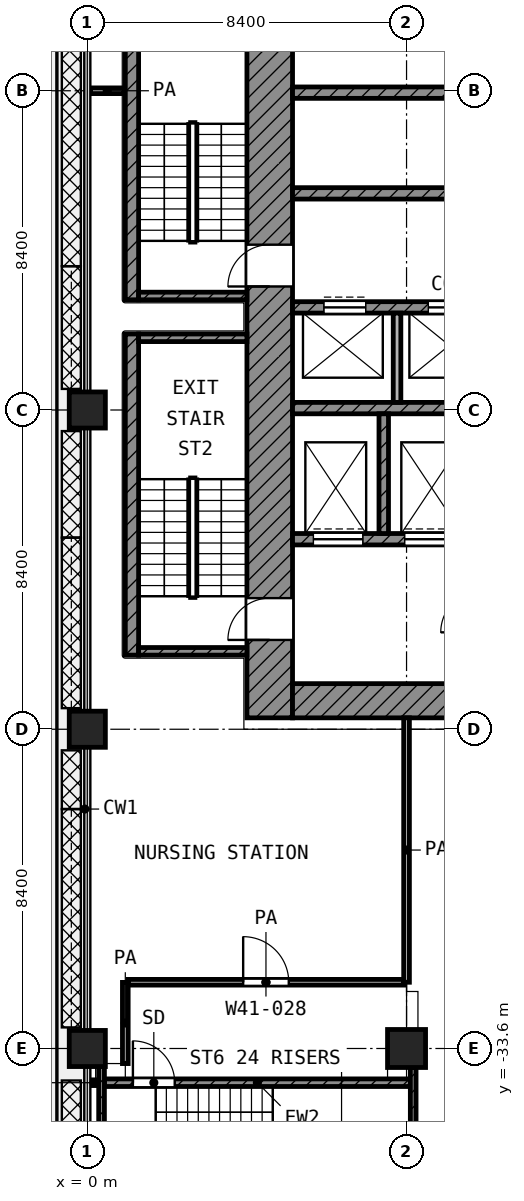
"""IFC4 building model, lengths in metres.
Left out: names, types, materials, properties, quantities, classifications, styles, units other than length and angle.
Written with IfcOpenShell. Run it as: python <this file> out.ifc"""

import sys

from ifc_helpers import new_model, si_unit, direction, frame, frame_2d, origin, origin_2d, place, context, subcontext, project, spatial, rectangle, extrude, element, fill, save


model = new_model("IFC4")
c1 = context("Model", 3, precision=1e-05, world=origin(), true_north=direction((0.0, 1.0)))
c2 = subcontext(c1, "Body", "Model", "MODEL_VIEW")
j1 = project(units=[si_unit("LENGTHUNIT", "METRE"), si_unit("PLANEANGLEUNIT", "RADIAN")], contexts=[c1])
p1 = place(None, origin())
s1 = spatial("IfcSite", under=j1, at=p1, CompositionType="ELEMENT")
p2 = place(p1, origin())
s2 = spatial("IfcBuilding", under=s1, at=p2, CompositionType="ELEMENT")
p3 = place(p2, frame((0.0, 0.0, 179.4)))
s3 = spatial("IfcBuildingStorey", under=s2, at=p3, CompositionType="ELEMENT", Elevation=179.4)
for number, where, z_axis, x_axis in (
    (1, (0.0, -16.8, 0.0), (0.0, 0.0, 1.0), (1.0, 0.0, 0.0)),
    (2, (0.0, -25.2, 0.0), (0.0, 0.0, 1.0), (1.0, 0.0, 0.0)),
    (3, (0.0, -33.6, 0.0), (0.0, 0.0, 1.0), (1.0, 0.0, 0.0)),
):
    element("IfcColumn", number, at=place(p3, frame(where, z_axis=z_axis, x_axis=x_axis)), inside=s3, PredefinedType="COLUMN", context=c2, shape_type="SweptSolid", body=[
        extrude(rectangle(XDim=0.95, YDim=0.95, at=origin_2d()), origin(), (0.0, 0.0, 1.0), 4.2),
    ])
p4 = place(p3, frame((8.4, -33.6, 0.0), z_axis=(0.0, 0.0, 1.0), x_axis=(1.0, 0.0, 0.0)))
e4 = element("IfcColumn", 4, at=p4, inside=s3, PredefinedType="COLUMN", context=c2, shape_type="SweptSolid", body=[
    extrude(rectangle(XDim=1.0, YDim=1.0, at=origin_2d()), origin(), (0.0, 0.0, 1.0), 4.2),
])
p5 = place(p3, frame((4.8, -24.9, 0.0), z_axis=(0.0, 0.0, 1.0), x_axis=(0.0, 1.0, 0.0)))
e5 = element("IfcWall", 5, at=p5, inside=s3, PredefinedType="SHEAR", context=c2, shape_type="SweptSolid", body=[
    extrude(rectangle(XDim=19.5, YDim=1.2, at=frame_2d((9.75, 0.0))), origin(), (0.0, 0.0, 1.0), 3.6),
])
p6 = place(p5, frame((11.35, 0.0, 0.0)))
e6 = element("IfcOpeningElement", 6, at=p6, cuts=e5, PredefinedType="OPENING", context=c2, shape_type="SweptSolid", body=[
    extrude(rectangle(XDim=1.1, YDim=2.1, at=frame_2d((0.55, 1.05))), frame((0.0, 0.61, 0.0), z_axis=(0.0, -1.0, 0.0), x_axis=(1.0, 0.0, 0.0)), (0.0, 0.0, 1.0), 1.22),
])
p7 = place(p5, frame((2.05, 0.0, 0.0)))
e7 = element("IfcOpeningElement", 7, at=p7, cuts=e5, PredefinedType="OPENING", context=c2, shape_type="SweptSolid", body=[
    extrude(rectangle(XDim=1.1, YDim=2.1, at=frame_2d((0.55, 1.05))), frame((0.0, 0.61, 0.0), z_axis=(0.0, -1.0, 0.0), x_axis=(1.0, 0.0, 0.0)), (0.0, 0.0, 1.0), 1.22),
])
p8 = place(p3, frame((5.4, -24.45, 0.0), z_axis=(0.0, 0.0, 1.0), x_axis=(1.0, 0.0, 0.0)))
e8 = element("IfcWall", 8, at=p8, inside=s3, PredefinedType="SHEAR", context=c2, shape_type="SweptSolid", body=[
    extrude(rectangle(XDim=18.6, YDim=0.9, at=frame_2d((9.3, 0.0))), origin(), (0.0, 0.0, 1.0), 3.6),
])
p9 = place(p8, frame((6.3, 0.0, 0.0)))
e9 = element("IfcOpeningElement", 9, at=p9, cuts=e8, PredefinedType="OPENING", context=c2, shape_type="SweptSolid", body=[
    extrude(rectangle(XDim=1.8, YDim=2.1, at=frame_2d((0.9, 1.05))), frame((0.0, 0.46, 0.0), z_axis=(0.0, -1.0, 0.0), x_axis=(1.0, 0.0, 0.0)), (0.0, 0.0, 1.0), 0.92),
])
p10 = place(p3, frame((5.4, -8.45, 0.0), z_axis=(0.0, 0.0, 1.0), x_axis=(1.0, 0.0, 0.0)))
e10 = element("IfcWall", 10, at=p10, inside=s3, PredefinedType="SHEAR", context=c2, shape_type="SweptSolid", body=[
    extrude(rectangle(XDim=16.65, YDim=0.3, at=frame_2d((8.325, 0.0))), origin(), (0.0, 0.0, 1.0), 3.6),
])
p11 = place(p3, frame((5.4, -11.1, 0.0), z_axis=(0.0, 0.0, 1.0), x_axis=(1.0, 0.0, 0.0)))
e11 = element("IfcWall", 11, at=p11, inside=s3, PredefinedType="SHEAR", context=c2, shape_type="SweptSolid", body=[
    extrude(rectangle(XDim=16.65, YDim=0.3, at=frame_2d((8.325, 0.0))), origin(), (0.0, 0.0, 1.0), 3.6),
])
p12 = place(p11, frame((11.825, 0.0, 0.0)))
e12 = element("IfcOpeningElement", 12, at=p12, cuts=e11, PredefinedType="OPENING", context=c2, shape_type="SweptSolid", body=[
    extrude(rectangle(XDim=1.1, YDim=2.1, at=frame_2d((0.55, 1.05))), frame((0.0, 0.16, 0.0), z_axis=(0.0, -1.0, 0.0), x_axis=(1.0, 0.0, 0.0)), (0.0, 0.0, 1.0), 0.32),
])
p13 = place(p11, frame((14.575, 0.0, 0.0)))
e13 = element("IfcOpeningElement", 13, at=p13, cuts=e11, PredefinedType="OPENING", context=c2, shape_type="SweptSolid", body=[
    extrude(rectangle(XDim=1.1, YDim=2.1, at=frame_2d((0.55, 1.05))), frame((0.0, 0.16, 0.0), z_axis=(0.0, -1.0, 0.0), x_axis=(1.0, 0.0, 0.0)), (0.0, 0.0, 1.0), 0.32),
])
p14 = place(p11, frame((5.05, 0.0, 0.0)))
e14 = element("IfcOpeningElement", 14, at=p14, cuts=e11, PredefinedType="OPENING", context=c2, shape_type="SweptSolid", body=[
    extrude(rectangle(XDim=0.9, YDim=2.1, at=frame_2d((0.45, 1.05))), frame((0.0, 0.16, 0.0), z_axis=(0.0, -1.0, 0.0), x_axis=(1.0, 0.0, 0.0)), (0.0, 0.0, 1.0), 0.32),
])
p15 = place(p3, frame((5.4, -14.1, 0.0), z_axis=(0.0, 0.0, 1.0), x_axis=(1.0, 0.0, 0.0)))
e15 = element("IfcWall", 15, at=p15, inside=s3, PredefinedType="SHEAR", context=c2, shape_type="SweptSolid", body=[
    extrude(rectangle(XDim=16.65, YDim=0.3, at=frame_2d((8.325, 0.0))), origin(), (0.0, 0.0, 1.0), 3.6),
])
p16 = place(p15, frame((0.825, 0.0, 0.0)))
e16 = element("IfcOpeningElement", 16, at=p16, cuts=e15, PredefinedType="OPENING", context=c2, shape_type="SweptSolid", body=[
    extrude(rectangle(XDim=1.1, YDim=2.1, at=frame_2d((0.55, 1.05))), frame((0.0, 0.16, 0.0), z_axis=(0.0, -1.0, 0.0), x_axis=(1.0, 0.0, 0.0)), (0.0, 0.0, 1.0), 0.32),
])
p17 = place(p15, frame((3.575, 0.0, 0.0)))
e17 = element("IfcOpeningElement", 17, at=p17, cuts=e15, PredefinedType="OPENING", context=c2, shape_type="SweptSolid", body=[
    extrude(rectangle(XDim=1.1, YDim=2.1, at=frame_2d((0.55, 1.05))), frame((0.0, 0.16, 0.0), z_axis=(0.0, -1.0, 0.0), x_axis=(1.0, 0.0, 0.0)), (0.0, 0.0, 1.0), 0.32),
])
p18 = place(p3, frame((5.4, -16.75, 0.0), z_axis=(0.0, 0.0, 1.0), x_axis=(1.0, 0.0, 0.0)))
e18 = element("IfcWall", 18, at=p18, inside=s3, PredefinedType="SHEAR", context=c2, shape_type="SweptSolid", body=[
    extrude(rectangle(XDim=16.65, YDim=0.3, at=frame_2d((8.325, 0.0))), origin(), (0.0, 0.0, 1.0), 3.6),
])
p19 = place(p3, frame((5.4, -20.2, 0.0), z_axis=(0.0, 0.0, 1.0), x_axis=(1.0, 0.0, 0.0)))
e19 = element("IfcWall", 19, at=p19, inside=s3, PredefinedType="SHEAR", context=c2, shape_type="SweptSolid", body=[
    extrude(rectangle(XDim=14.65, YDim=0.3, at=frame_2d((7.325, 0.0))), origin(), (0.0, 0.0, 1.0), 3.6),
])
p20 = place(p19, frame((10.55, 0.0, 0.0)))
e20 = element("IfcOpeningElement", 20, at=p20, cuts=e19, PredefinedType="OPENING", context=c2, shape_type="SweptSolid", body=[
    extrude(rectangle(XDim=1.3, YDim=2.1, at=frame_2d((0.65, 1.05))), frame((0.0, 0.16, 0.0), z_axis=(0.0, -1.0, 0.0), x_axis=(1.0, 0.0, 0.0)), (0.0, 0.0, 1.0), 0.32),
])
p21 = place(p19, frame((12.95, 0.0, 0.0)))
e21 = element("IfcOpeningElement", 21, at=p21, cuts=e19, PredefinedType="OPENING", context=c2, shape_type="SweptSolid", body=[
    extrude(rectangle(XDim=1.3, YDim=2.1, at=frame_2d((0.65, 1.05))), frame((0.0, 0.16, 0.0), z_axis=(0.0, -1.0, 0.0), x_axis=(1.0, 0.0, 0.0)), (0.0, 0.0, 1.0), 0.32),
])
p22 = place(p19, frame((0.55, 0.0, 0.0)))
e22 = element("IfcOpeningElement", 22, at=p22, cuts=e19, PredefinedType="OPENING", context=c2, shape_type="SweptSolid", body=[
    extrude(rectangle(XDim=1.3, YDim=2.1, at=frame_2d((0.65, 1.05))), frame((0.0, 0.16, 0.0), z_axis=(0.0, -1.0, 0.0), x_axis=(1.0, 0.0, 0.0)), (0.0, 0.0, 1.0), 0.32),
])
p23 = place(p19, frame((2.95, 0.0, 0.0)))
e23 = element("IfcOpeningElement", 23, at=p23, cuts=e19, PredefinedType="OPENING", context=c2, shape_type="SweptSolid", body=[
    extrude(rectangle(XDim=1.3, YDim=2.1, at=frame_2d((0.65, 1.05))), frame((0.0, 0.16, 0.0), z_axis=(0.0, -1.0, 0.0), x_axis=(1.0, 0.0, 0.0)), (0.0, 0.0, 1.0), 0.32),
])
p24 = place(p19, frame((6.55, 0.0, 0.0)))
e24 = element("IfcOpeningElement", 24, at=p24, cuts=e19, PredefinedType="OPENING", context=c2, shape_type="SweptSolid", body=[
    extrude(rectangle(XDim=0.9, YDim=2.1, at=frame_2d((0.45, 1.05))), frame((0.0, 0.16, 0.0), z_axis=(0.0, -1.0, 0.0), x_axis=(1.0, 0.0, 0.0)), (0.0, 0.0, 1.0), 0.32),
])
p25 = place(p19, frame((8.95, 0.0, 0.0)))
e25 = element("IfcOpeningElement", 25, at=p25, cuts=e19, PredefinedType="OPENING", context=c2, shape_type="SweptSolid", body=[
    extrude(rectangle(XDim=0.9, YDim=2.1, at=frame_2d((0.45, 1.05))), frame((0.0, 0.16, 0.0), z_axis=(0.0, -1.0, 0.0), x_axis=(1.0, 0.0, 0.0)), (0.0, 0.0, 1.0), 0.32),
])
p26 = place(p3, frame((7.8, -20.05, 0.0), z_axis=(0.0, 0.0, 1.0), x_axis=(0.0, 1.0, 0.0)))
e26 = element("IfcWall", 26, at=p26, inside=s3, PredefinedType="SHEAR", context=c2, shape_type="SweptSolid", body=[
    extrude(rectangle(XDim=3.15, YDim=0.25, at=frame_2d((1.575, 0.0))), origin(), (0.0, 0.0, 1.0), 3.6),
])
p27 = place(p3, frame((8.15, -16.6, 0.0), z_axis=(0.0, 0.0, 1.0), x_axis=(0.0, 1.0, 0.0)))
e27 = element("IfcWall", 27, at=p27, inside=s3, PredefinedType="PARTITIONING", context=c2, shape_type="SweptSolid", body=[
    extrude(rectangle(XDim=2.35, YDim=0.2, at=frame_2d((1.175, 0.0))), origin(), (0.0, 0.0, 1.0), 3.6),
])
p28 = place(p3, frame((1.175, -13.9, 0.0), z_axis=(0.0, 0.0, 1.0), x_axis=(0.0, 1.0, 0.0)))
e28 = element("IfcWall", 28, at=p28, inside=s3, PredefinedType="SHEAR", context=c2, shape_type="SweptSolid", body=[
    extrude(rectangle(XDim=8.45, YDim=0.35, at=frame_2d((4.225, 0.0))), origin(), (0.0, 0.0, 1.0), 3.6),
])
p29 = place(p3, frame((1.35, -13.8, 0.0), z_axis=(0.0, 0.0, 1.0), x_axis=(1.0, 0.0, 0.0)))
e29 = element("IfcWall", 29, at=p29, inside=s3, PredefinedType="SHEAR", context=c2, shape_type="SweptSolid", body=[
    extrude(rectangle(XDim=2.85, YDim=0.2, at=frame_2d((1.425, 0.0))), origin(), (0.0, 0.0, 1.0), 3.6),
])
p30 = place(p3, frame((1.175, -23.25, 0.0), z_axis=(0.0, 0.0, 1.0), x_axis=(0.0, 1.0, 0.0)))
e30 = element("IfcWall", 30, at=p30, inside=s3, PredefinedType="SHEAR", context=c2, shape_type="SweptSolid", body=[
    extrude(rectangle(XDim=8.45, YDim=0.35, at=frame_2d((4.225, 0.0))), origin(), (0.0, 0.0, 1.0), 3.6),
])
for number, where, z_axis, x_axis in (
    (31, (1.35, -14.9, 0.0), (0.0, 0.0, 1.0), (1.0, 0.0, 0.0)),
    (32, (1.35, -23.15, 0.0), (0.0, 0.0, 1.0), (1.0, 0.0, 0.0)),
):
    element("IfcWall", number, at=place(p3, frame(where, z_axis=z_axis, x_axis=x_axis)), inside=s3, PredefinedType="SHEAR", context=c2, shape_type="SweptSolid", body=[
        extrude(rectangle(XDim=2.85, YDim=0.2, at=frame_2d((1.425, 0.0))), origin(), (0.0, 0.0, 1.0), 3.6),
    ])
p31 = place(p3, frame((0.375, -40.05, 0.0), z_axis=(0.0, 0.0, 1.0), x_axis=(0.0, 1.0, 0.0)))
e33 = element("IfcWall", 33, at=p31, inside=s3, PredefinedType="SHEAR", context=c2, shape_type="SweptSolid", body=[
    extrude(rectangle(XDim=5.975, YDim=0.15, at=frame_2d((2.988, 0.0))), origin(), (0.0, 0.0, 1.0), 3.6),
])
p32 = place(p3, frame((8.575, -40.05, 0.0), z_axis=(0.0, 0.0, 1.0), x_axis=(0.0, 1.0, 0.0)))
e34 = element("IfcWall", 34, at=p32, inside=s3, PredefinedType="SHEAR", context=c2, shape_type="SweptSolid", body=[
    extrude(rectangle(XDim=5.95, YDim=0.15, at=frame_2d((2.975, 0.0))), origin(), (0.0, 0.0, 1.0), 3.6),
])
p33 = place(p3, frame((0.45, -34.5, 0.0), z_axis=(0.0, 0.0, 1.0), x_axis=(1.0, 0.0, 0.0)))
e35 = element("IfcWall", 35, at=p33, inside=s3, PredefinedType="SHEAR", context=c2, shape_type="SweptSolid", body=[
    extrude(rectangle(XDim=8.05, YDim=0.2, at=frame_2d((4.025, 0.0))), origin(), (0.0, 0.0, 1.0), 3.6),
])
p34 = place(p33, frame((0.75, 0.0, 0.0)))
e36 = element("IfcOpeningElement", 36, at=p34, cuts=e35, PredefinedType="OPENING", context=c2, shape_type="SweptSolid", body=[
    extrude(rectangle(XDim=1.1, YDim=2.1, at=frame_2d((0.55, 1.05))), frame((0.0, 0.11, 0.0), z_axis=(0.0, -1.0, 0.0), x_axis=(1.0, 0.0, 0.0)), (0.0, 0.0, 1.0), 0.22),
])
p35 = place(p3, frame((0.08, -34.5, 0.0), z_axis=(0.0, 0.0, 1.0), x_axis=(1.0, 0.0, 0.0)))
e37 = element("IfcWall", 37, at=p35, inside=s3, PredefinedType="PARTITIONING", context=c2, shape_type="SweptSolid", body=[
    extrude(rectangle(XDim=0.19, YDim=0.15, at=frame_2d((0.095, 0.0))), origin(), (0.0, 0.0, 1.0), 3.6),
])
p36 = place(p3, frame((1.077, -31.857, 0.0), z_axis=(0.0, 0.0, 1.0), x_axis=(1.0, 0.0, 0.0)))
e38 = element("IfcWall", 38, at=p36, inside=s3, PredefinedType="PARTITIONING", context=c2, shape_type="SweptSolid", body=[
    extrude(rectangle(XDim=7.248, YDim=0.15, at=frame_2d((3.624, 0.0))), origin(), (0.0, 0.0, 1.0), 3.6),
])
p37 = place(p36, frame((3.024, 0.0, 0.0)))
e39 = element("IfcOpeningElement", 39, at=p37, cuts=e38, PredefinedType="OPENING", context=c2, shape_type="SweptSolid", body=[
    extrude(rectangle(XDim=1.2, YDim=2.1, at=frame_2d((0.6, 1.05))), frame((0.0, 0.085, 0.0), z_axis=(0.0, -1.0, 0.0), x_axis=(1.0, 0.0, 0.0)), (0.0, 0.0, 1.0), 0.17),
])
p38 = place(p3, frame((0.08, -8.4, 0.0), z_axis=(0.0, 0.0, 1.0), x_axis=(1.0, 0.0, 0.0)))
e40 = element("IfcWall", 40, at=p38, inside=s3, PredefinedType="PARTITIONING", context=c2, shape_type="SweptSolid", body=[
    extrude(rectangle(XDim=0.89, YDim=0.15, at=frame_2d((0.445, 0.0))), origin(), (0.0, 0.0, 1.0), 3.6),
])
p39 = place(p3, frame((1.0, -33.997, 0.0), z_axis=(0.0, 0.0, 1.0), x_axis=(0.0, 1.0, 0.0)))
e41 = element("IfcWall", 41, at=p39, inside=s3, PredefinedType="PARTITIONING", context=c2, shape_type="SweptSolid", body=[
    extrude(rectangle(XDim=2.136, YDim=0.15, at=frame_2d((1.068, 0.0))), origin(), (0.0, 0.0, 1.0), 3.6),
])
p40 = place(p3, frame((8.4, -31.857, 0.0), z_axis=(0.0, 0.0, 1.0), x_axis=(0.0, 1.0, 0.0)))
e42 = element("IfcWall", 42, at=p40, inside=s3, PredefinedType="PARTITIONING", context=c2, shape_type="SweptSolid", body=[
    extrude(rectangle(XDim=6.957, YDim=0.15, at=frame_2d((3.479, 0.0))), origin(), (0.0, 0.0, 1.0), 3.6),
])
p41 = place(p16, origin())
e43 = element("IfcDoor", 43, at=p41, inside=s3, OperationType="DOUBLE_DOOR_SLIDING", PredefinedType="DOOR", context=c2, shape_type="SweptSolid", body=[
    extrude(rectangle(XDim=1.1, YDim=2.1, at=frame_2d((0.55, 1.05))), frame((0.0, 0.025, 0.0), z_axis=(0.0, -1.0, 0.0), x_axis=(1.0, 0.0, 0.0)), (0.0, 0.0, 1.0), 0.05),
])
fill(e16, e43)
p42 = place(p17, origin())
e44 = element("IfcDoor", 44, at=p42, inside=s3, OperationType="DOUBLE_DOOR_SLIDING", PredefinedType="DOOR", context=c2, shape_type="SweptSolid", body=[
    extrude(rectangle(XDim=1.1, YDim=2.1, at=frame_2d((0.55, 1.05))), frame((0.0, 0.025, 0.0), z_axis=(0.0, -1.0, 0.0), x_axis=(1.0, 0.0, 0.0)), (0.0, 0.0, 1.0), 0.05),
])
fill(e17, e44)
p43 = place(p22, origin())
e45 = element("IfcDoor", 45, at=p43, inside=s3, OperationType="DOUBLE_DOOR_SLIDING", PredefinedType="DOOR", context=c2, shape_type="SweptSolid", body=[
    extrude(rectangle(XDim=1.3, YDim=2.1, at=frame_2d((0.65, 1.05))), frame((0.0, 0.025, 0.0), z_axis=(0.0, -1.0, 0.0), x_axis=(1.0, 0.0, 0.0)), (0.0, 0.0, 1.0), 0.05),
])
fill(e22, e45)
p44 = place(p23, origin())
e46 = element("IfcDoor", 46, at=p44, inside=s3, OperationType="DOUBLE_DOOR_SLIDING", PredefinedType="DOOR", context=c2, shape_type="SweptSolid", body=[
    extrude(rectangle(XDim=1.3, YDim=2.1, at=frame_2d((0.65, 1.05))), frame((0.0, 0.025, 0.0), z_axis=(0.0, -1.0, 0.0), x_axis=(1.0, 0.0, 0.0)), (0.0, 0.0, 1.0), 0.05),
])
fill(e23, e46)
p45 = place(p6, origin())
e47 = element("IfcDoor", 47, at=p45, inside=s3, OperationType="SINGLE_SWING_LEFT", PredefinedType="DOOR", context=c2, shape_type="SweptSolid", body=[
    extrude(rectangle(XDim=1.1, YDim=2.1, at=frame_2d((0.55, 1.05))), frame((0.0, 0.025, 0.0), z_axis=(0.0, -1.0, 0.0), x_axis=(1.0, 0.0, 0.0)), (0.0, 0.0, 1.0), 0.05),
])
fill(e6, e47)
p46 = place(p7, origin())
e48 = element("IfcDoor", 48, at=p46, inside=s3, OperationType="SINGLE_SWING_LEFT", PredefinedType="DOOR", context=c2, shape_type="SweptSolid", body=[
    extrude(rectangle(XDim=1.1, YDim=2.1, at=frame_2d((0.55, 1.05))), frame((0.0, 0.025, 0.0), z_axis=(0.0, -1.0, 0.0), x_axis=(1.0, 0.0, 0.0)), (0.0, 0.0, 1.0), 0.05),
])
fill(e7, e48)
p47 = place(p34, origin())
e49 = element("IfcDoor", 49, at=p47, inside=s3, OperationType="SINGLE_SWING_LEFT", PredefinedType="DOOR", context=c2, shape_type="SweptSolid", body=[
    extrude(rectangle(XDim=1.1, YDim=2.1, at=frame_2d((0.55, 1.05))), frame((0.0, 0.025, 0.0), z_axis=(0.0, -1.0, 0.0), x_axis=(1.0, 0.0, 0.0)), (0.0, 0.0, 1.0), 0.05),
])
fill(e36, e49)
p48 = place(p37, origin())
e50 = element("IfcDoor", 50, at=p48, inside=s3, OperationType="SINGLE_SWING_LEFT", PredefinedType="DOOR", context=c2, shape_type="SweptSolid", body=[
    extrude(rectangle(XDim=1.2, YDim=2.1, at=frame_2d((0.6, 1.05))), frame((0.0, 0.025, 0.0), z_axis=(0.0, -1.0, 0.0), x_axis=(1.0, 0.0, 0.0)), (0.0, 0.0, 1.0), 0.05),
])
fill(e39, e50)
save(model, sys.argv[1])
